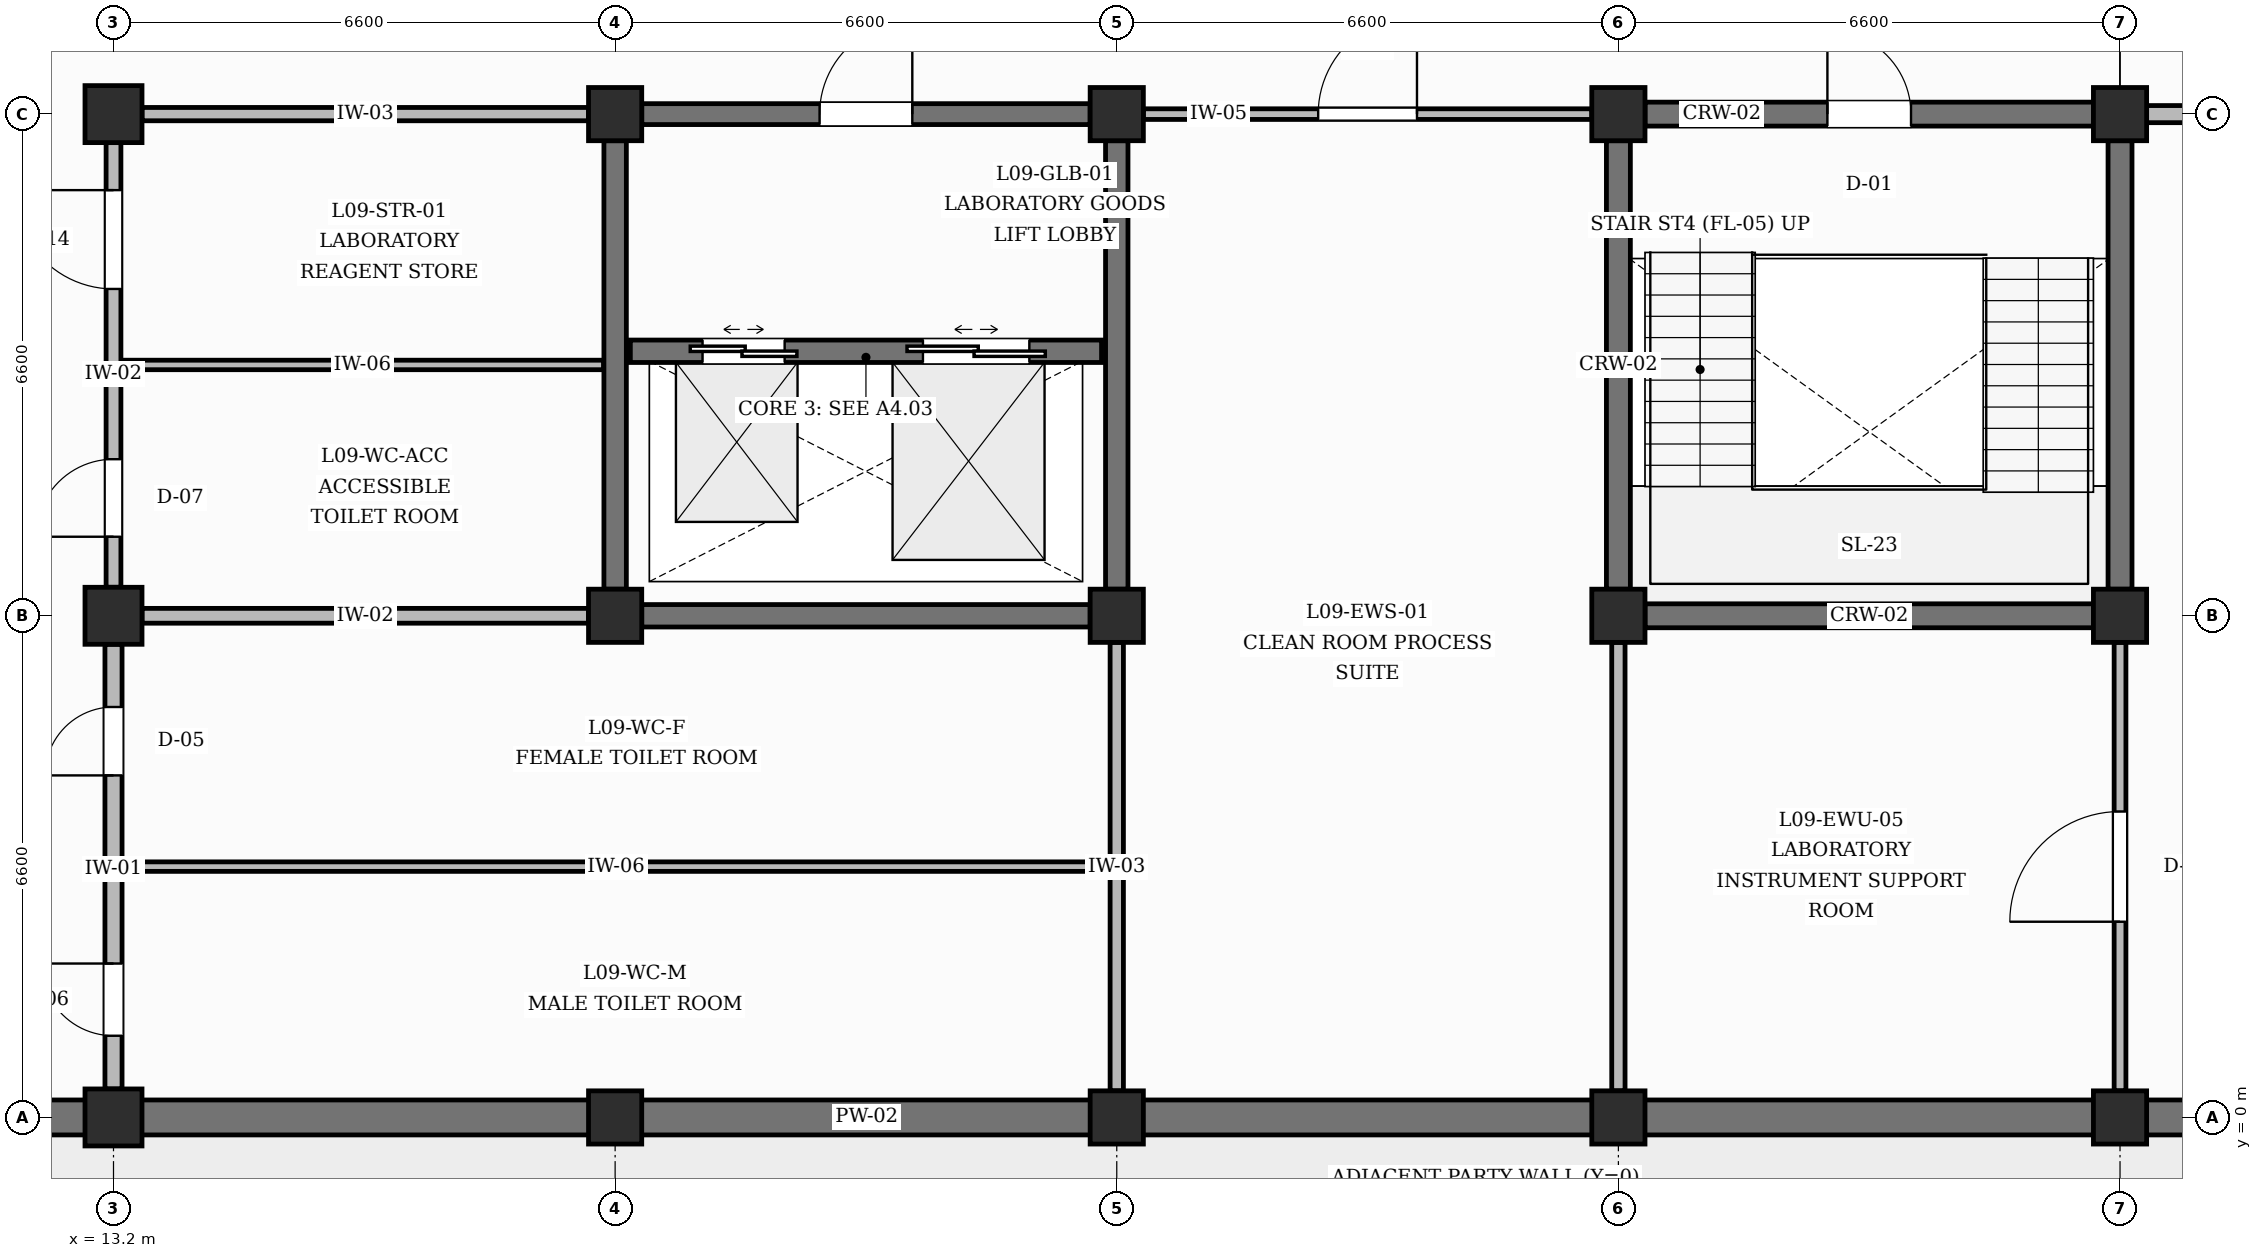
"""IFC4 building model, lengths in metres.
Left out: names, types, materials, properties, quantities, classifications, styles, units other than length and angle.
Written with IfcOpenShell. Run it as: python <this file> out.ifc"""

import sys

from ifc_helpers import new_model, si_unit, direction, frame, frame_2d, origin, origin_2d, place, context, subcontext, project, spatial, rectangle, extrude, element, fill, save


model = new_model("IFC4")
c1 = context("Model", 3, precision=1e-05, world=origin(), true_north=direction((0.0, 1.0)))
c2 = subcontext(c1, "Body", "Model", "MODEL_VIEW")
j1 = project(units=[si_unit("LENGTHUNIT", "METRE"), si_unit("PLANEANGLEUNIT", "RADIAN")], contexts=[c1])
p1 = place(None, origin())
s1 = spatial("IfcSite", under=j1, at=p1, CompositionType="ELEMENT")
p2 = place(p1, origin())
s2 = spatial("IfcBuilding", under=s1, at=p2, CompositionType="ELEMENT")
p3 = place(p2, frame((0.0, 0.0, 39.6)))
s3 = spatial("IfcBuildingStorey", under=s2, at=p3, CompositionType="ELEMENT", Elevation=39.6)
for number, where, z_axis, x_axis in (
    (1, (13.2, 0.0, 0.0), (0.0, 0.0, 1.0), (1.0, 0.0, 0.0)),
    (2, (13.2, 6.6, 0.0), (0.0, 0.0, 1.0), (1.0, 0.0, 0.0)),
    (3, (13.2, 13.2, 0.0), (0.0, 0.0, 1.0), (1.0, 0.0, 0.0)),
):
    element("IfcColumn", number, at=place(p3, frame(where, z_axis=z_axis, x_axis=x_axis)), inside=s3, PredefinedType="COLUMN", context=c2, shape_type="SweptSolid", body=[
        extrude(rectangle(XDim=0.75, YDim=0.75, at=origin_2d()), origin(), (0.0, 0.0, 1.0), 4.2),
    ])
for number, where, z_axis, x_axis in (
    (4, (19.8, 0.0, 0.0), (0.0, 0.0, 1.0), (1.0, 0.0, 0.0)),
    (5, (19.8, 6.6, 0.0), (0.0, 0.0, 1.0), (1.0, 0.0, 0.0)),
    (6, (19.8, 13.2, 0.0), (0.0, 0.0, 1.0), (1.0, 0.0, 0.0)),
    (7, (26.4, 0.0, 0.0), (0.0, 0.0, 1.0), (1.0, 0.0, 0.0)),
    (8, (26.4, 6.6, 0.0), (0.0, 0.0, 1.0), (1.0, 0.0, 0.0)),
    (9, (26.4, 13.2, 0.0), (0.0, 0.0, 1.0), (1.0, 0.0, 0.0)),
    (10, (33.0, 0.0, 0.0), (0.0, 0.0, 1.0), (1.0, 0.0, 0.0)),
    (11, (33.0, 6.6, 0.0), (0.0, 0.0, 1.0), (1.0, 0.0, 0.0)),
    (12, (33.0, 13.2, 0.0), (0.0, 0.0, 1.0), (1.0, 0.0, 0.0)),
    (13, (39.6, 0.0, 0.0), (0.0, 0.0, 1.0), (1.0, 0.0, 0.0)),
    (14, (39.6, 6.6, 0.0), (0.0, 0.0, 1.0), (1.0, 0.0, 0.0)),
    (15, (39.6, 13.2, 0.0), (0.0, 0.0, 1.0), (1.0, 0.0, 0.0)),
):
    element("IfcColumn", number, at=place(p3, frame(where, z_axis=z_axis, x_axis=x_axis)), inside=s3, PredefinedType="COLUMN", context=c2, shape_type="SweptSolid", body=[
        extrude(rectangle(XDim=0.7, YDim=0.7, at=origin_2d()), origin(), (0.0, 0.0, 1.0), 4.2),
    ])
p4 = place(p3, frame((6.975, 0.0, 0.0), z_axis=(0.0, 0.0, 1.0), x_axis=(1.0, 0.0, 0.0)))
e16 = element("IfcWall", 16, at=p4, inside=s3, PredefinedType="SOLIDWALL", context=c2, shape_type="SweptSolid", body=[
    extrude(rectangle(XDim=5.85, YDim=0.46, at=frame_2d((2.925, 0.0))), origin(), (0.0, 0.0, 1.0), 3.29),
])
p5 = place(p3, frame((13.575, 0.0, 0.0), z_axis=(0.0, 0.0, 1.0), x_axis=(1.0, 0.0, 0.0)))
e17 = element("IfcWall", 17, at=p5, inside=s3, PredefinedType="SOLIDWALL", context=c2, shape_type="SweptSolid", body=[
    extrude(rectangle(XDim=5.875, YDim=0.46, at=frame_2d((2.938, 0.0))), origin(), (0.0, 0.0, 1.0), 3.29),
])
p6 = place(p3, frame((20.15, 0.0, 0.0), z_axis=(0.0, 0.0, 1.0), x_axis=(1.0, 0.0, 0.0)))
e18 = element("IfcWall", 18, at=p6, inside=s3, PredefinedType="SOLIDWALL", context=c2, shape_type="SweptSolid", body=[
    extrude(rectangle(XDim=5.9, YDim=0.46, at=frame_2d((2.95, 0.0))), origin(), (0.0, 0.0, 1.0), 3.29),
])
for number, where, z_axis, x_axis in (
    (19, (26.75, 0.0, 0.0), (0.0, 0.0, 1.0), (1.0, 0.0, 0.0)),
    (20, (33.35, 0.0, 0.0), (0.0, 0.0, 1.0), (1.0, 0.0, 0.0)),
):
    element("IfcWall", number, at=place(p3, frame(where, z_axis=z_axis, x_axis=x_axis)), inside=s3, PredefinedType="SOLIDWALL", context=c2, shape_type="SweptSolid", body=[
        extrude(rectangle(XDim=5.9, YDim=0.46, at=frame_2d((2.95, 0.0))), origin(), (0.0, 0.0, 1.0), 3.29),
    ])
p7 = place(p3, frame((39.95, 0.0, 0.0), z_axis=(0.0, 0.0, 1.0), x_axis=(1.0, 0.0, 0.0)))
e21 = element("IfcWall", 21, at=p7, inside=s3, PredefinedType="SOLIDWALL", context=c2, shape_type="SweptSolid", body=[
    extrude(rectangle(XDim=5.9, YDim=0.46, at=frame_2d((2.95, 0.0))), origin(), (0.0, 0.0, 1.0), 3.29),
])
p8 = place(p3, frame((33.35, 6.6, 0.0), z_axis=(0.0, 0.0, 1.0), x_axis=(1.0, 0.0, 0.0)))
e22 = element("IfcWall", 22, at=p8, inside=s3, PredefinedType="SHEAR", context=c2, shape_type="SweptSolid", body=[
    extrude(rectangle(XDim=5.9, YDim=0.315, at=frame_2d((2.95, 0.0))), origin(), (0.0, 0.0, 1.0), 3.29),
])
p9 = place(p3, frame((33.35, 13.2, 0.0), z_axis=(0.0, 0.0, 1.0), x_axis=(1.0, 0.0, 0.0)))
e23 = element("IfcWall", 23, at=p9, inside=s3, PredefinedType="SHEAR", context=c2, shape_type="SweptSolid", body=[
    extrude(rectangle(XDim=5.9, YDim=0.315, at=frame_2d((2.95, 0.0))), origin(), (0.0, 0.0, 1.0), 3.29),
])
p10 = place(p9, frame((2.4, 0.0, 0.0)))
e24 = element("IfcOpeningElement", 24, at=p10, cuts=e23, PredefinedType="OPENING", context=c2, shape_type="SweptSolid", body=[
    extrude(rectangle(XDim=1.1, YDim=2.15, at=frame_2d((0.55, 1.075))), frame((0.0, 0.167, 0.0), z_axis=(0.0, -1.0, 0.0), x_axis=(1.0, 0.0, 0.0)), (0.0, 0.0, 1.0), 0.335),
])
for number, where, z_axis, x_axis in (
    (25, (33.0, 6.95, 0.0), (0.0, 0.0, 1.0), (0.0, 1.0, 0.0)),
    (26, (39.6, 6.95, 0.0), (0.0, 0.0, 1.0), (0.0, 1.0, 0.0)),
):
    element("IfcWall", number, at=place(p3, frame(where, z_axis=z_axis, x_axis=x_axis)), inside=s3, PredefinedType="SHEAR", context=c2, shape_type="SweptSolid", body=[
        extrude(rectangle(XDim=5.9, YDim=0.315, at=frame_2d((2.95, 0.0))), origin(), (0.0, 0.0, 1.0), 3.29),
    ])
for number, where, z_axis, x_axis in (
    (27, (20.15, 6.6, 0.0), (0.0, 0.0, 1.0), (1.0, 0.0, 0.0)),
    (28, (19.8, 6.95, 0.0), (0.0, 0.0, 1.0), (0.0, 1.0, 0.0)),
    (29, (26.4, 6.95, 0.0), (0.0, 0.0, 1.0), (0.0, 1.0, 0.0)),
):
    element("IfcWall", number, at=place(p3, frame(where, z_axis=z_axis, x_axis=x_axis)), inside=s3, PredefinedType="SHEAR", context=c2, shape_type="SweptSolid", body=[
        extrude(rectangle(XDim=5.9, YDim=0.295, at=frame_2d((2.95, 0.0))), origin(), (0.0, 0.0, 1.0), 3.29),
    ])
p11 = place(p3, frame((20.15, 13.2, 0.0), z_axis=(0.0, 0.0, 1.0), x_axis=(1.0, 0.0, 0.0)))
e30 = element("IfcWall", 30, at=p11, inside=s3, PredefinedType="SHEAR", context=c2, shape_type="SweptSolid", body=[
    extrude(rectangle(XDim=5.9, YDim=0.275, at=frame_2d((2.95, 0.0))), origin(), (0.0, 0.0, 1.0), 3.29),
])
p12 = place(p11, frame((2.34, 0.0, 0.0)))
e31 = element("IfcOpeningElement", 31, at=p12, cuts=e30, PredefinedType="OPENING", context=c2, shape_type="SweptSolid", body=[
    extrude(rectangle(XDim=1.22, YDim=2.15, at=frame_2d((0.61, 1.075))), frame((0.0, 0.147, 0.0), z_axis=(0.0, -1.0, 0.0), x_axis=(1.0, 0.0, 0.0)), (0.0, 0.0, 1.0), 0.295),
])
p13 = place(p3, frame((20.0, 10.08, 0.0), z_axis=(0.0, 0.0, 1.0), x_axis=(1.0, 0.0, 0.0)))
e32 = element("IfcWall", 32, at=p13, inside=s3, PredefinedType="SHEAR", context=c2, shape_type="SweptSolid", body=[
    extrude(rectangle(XDim=6.2, YDim=0.295, at=frame_2d((3.1, 0.0))), origin(), (0.0, 0.0, 1.0), 3.89),
])
p14 = place(p13, frame((0.95, 0.0, 0.0)))
e33 = element("IfcOpeningElement", 33, at=p14, cuts=e32, PredefinedType="OPENING", context=c2, shape_type="SweptSolid", body=[
    extrude(rectangle(XDim=1.08, YDim=2.15, at=frame_2d((0.54, 1.075))), frame((0.0, 0.157, 0.0), z_axis=(0.0, -1.0, 0.0), x_axis=(1.0, 0.0, 0.0)), (0.0, 0.0, 1.0), 0.315),
])
p15 = place(p13, frame((3.85, 0.0, 0.0)))
e34 = element("IfcOpeningElement", 34, at=p15, cuts=e32, PredefinedType="OPENING", context=c2, shape_type="SweptSolid", body=[
    extrude(rectangle(XDim=1.4, YDim=2.35, at=frame_2d((0.7, 1.175))), frame((0.0, 0.157, 0.0), z_axis=(0.0, -1.0, 0.0), x_axis=(1.0, 0.0, 0.0)), (0.0, 0.0, 1.0), 0.315),
])
p16 = place(p3, frame((13.2, 0.375, 0.0), z_axis=(0.0, 0.0, 1.0), x_axis=(0.0, 1.0, 0.0)))
e35 = element("IfcWall", 35, at=p16, inside=s3, PredefinedType="PARTITIONING", context=c2, shape_type="SweptSolid", body=[
    extrude(rectangle(XDim=5.85, YDim=0.225, at=frame_2d((2.925, 0.0))), origin(), (0.0, 0.0, 1.0), 3.29),
])
p17 = place(p16, frame((0.7, 0.0, 0.0)))
e36 = element("IfcOpeningElement", 36, at=p17, cuts=e35, PredefinedType="OPENING", context=c2, shape_type="SweptSolid", body=[
    extrude(rectangle(XDim=0.95, YDim=2.1, at=frame_2d((0.475, 1.05))), frame((0.0, 0.123, 0.0), z_axis=(0.0, -1.0, 0.0), x_axis=(1.0, 0.0, 0.0)), (0.0, 0.0, 1.0), 0.245),
])
p18 = place(p16, frame((4.125, 0.0, 0.0)))
e37 = element("IfcOpeningElement", 37, at=p18, cuts=e35, PredefinedType="OPENING", context=c2, shape_type="SweptSolid", body=[
    extrude(rectangle(XDim=0.9, YDim=2.1, at=frame_2d((0.45, 1.05))), frame((0.0, 0.123, 0.0), z_axis=(0.0, -1.0, 0.0), x_axis=(1.0, 0.0, 0.0)), (0.0, 0.0, 1.0), 0.245),
])
p19 = place(p3, frame((26.4, 0.35, 0.0), z_axis=(0.0, 0.0, 1.0), x_axis=(0.0, 1.0, 0.0)))
e38 = element("IfcWall", 38, at=p19, inside=s3, PredefinedType="PARTITIONING", context=c2, shape_type="SweptSolid", body=[
    extrude(rectangle(XDim=5.9, YDim=0.175, at=frame_2d((2.95, 0.0))), origin(), (0.0, 0.0, 1.0), 3.29),
])
p20 = place(p3, frame((13.575, 6.6, 0.0), z_axis=(0.0, 0.0, 1.0), x_axis=(1.0, 0.0, 0.0)))
e39 = element("IfcWall", 39, at=p20, inside=s3, PredefinedType="PARTITIONING", context=c2, shape_type="SweptSolid", body=[
    extrude(rectangle(XDim=5.875, YDim=0.195, at=frame_2d((2.938, 0.0))), origin(), (0.0, 0.0, 1.0), 3.29),
])
p21 = place(p3, frame((13.2, 6.975, 0.0), z_axis=(0.0, 0.0, 1.0), x_axis=(0.0, 1.0, 0.0)))
e40 = element("IfcWall", 40, at=p21, inside=s3, PredefinedType="PARTITIONING", context=c2, shape_type="SweptSolid", body=[
    extrude(rectangle(XDim=5.85, YDim=0.195, at=frame_2d((2.925, 0.0))), origin(), (0.0, 0.0, 1.0), 3.29),
])
p22 = place(p21, frame((0.665, 0.0, 0.0)))
e41 = element("IfcOpeningElement", 41, at=p22, cuts=e40, PredefinedType="OPENING", context=c2, shape_type="SweptSolid", body=[
    extrude(rectangle(XDim=1.02, YDim=2.15, at=frame_2d((0.51, 1.075))), frame((0.0, 0.107, 0.0), z_axis=(0.0, -1.0, 0.0), x_axis=(1.0, 0.0, 0.0)), (0.0, 0.0, 1.0), 0.215),
])
p23 = place(p21, frame((3.925, 0.0, 0.0)))
e42 = element("IfcOpeningElement", 42, at=p23, cuts=e40, PredefinedType="OPENING", context=c2, shape_type="SweptSolid", body=[
    extrude(rectangle(XDim=1.3, YDim=2.3, at=frame_2d((0.65, 1.15))), frame((0.0, 0.107, 0.0), z_axis=(0.0, -1.0, 0.0), x_axis=(1.0, 0.0, 0.0)), (0.0, 0.0, 1.0), 0.215),
])
p24 = place(p3, frame((13.575, 13.2, 0.0), z_axis=(0.0, 0.0, 1.0), x_axis=(1.0, 0.0, 0.0)))
e43 = element("IfcWall", 43, at=p24, inside=s3, PredefinedType="PARTITIONING", context=c2, shape_type="SweptSolid", body=[
    extrude(rectangle(XDim=5.875, YDim=0.175, at=frame_2d((2.938, 0.0))), origin(), (0.0, 0.0, 1.0), 3.29),
])
p25 = place(p3, frame((33.0, 0.35, 0.0), z_axis=(0.0, 0.0, 1.0), x_axis=(0.0, 1.0, 0.0)))
e44 = element("IfcWall", 44, at=p25, inside=s3, PredefinedType="PARTITIONING", context=c2, shape_type="SweptSolid", body=[
    extrude(rectangle(XDim=5.9, YDim=0.175, at=frame_2d((2.95, 0.0))), origin(), (0.0, 0.0, 1.0), 3.29),
])
p26 = place(p3, frame((26.75, 13.2, 0.0), z_axis=(0.0, 0.0, 1.0), x_axis=(1.0, 0.0, 0.0)))
e45 = element("IfcWall", 45, at=p26, inside=s3, PredefinedType="PARTITIONING", context=c2, shape_type="SweptSolid", body=[
    extrude(rectangle(XDim=5.9, YDim=0.14, at=frame_2d((2.95, 0.0))), origin(), (0.0, 0.0, 1.0), 3.29),
])
p27 = place(p26, frame((2.3, 0.0, 0.0)))
e46 = element("IfcOpeningElement", 46, at=p27, cuts=e45, PredefinedType="OPENING", context=c2, shape_type="SweptSolid", body=[
    extrude(rectangle(XDim=1.3, YDim=2.3, at=frame_2d((0.65, 1.15))), frame((0.0, 0.08, 0.0), z_axis=(0.0, -1.0, 0.0), x_axis=(1.0, 0.0, 0.0)), (0.0, 0.0, 1.0), 0.16),
])
p28 = place(p3, frame((39.6, 0.35, 0.0), z_axis=(0.0, 0.0, 1.0), x_axis=(0.0, 1.0, 0.0)))
e47 = element("IfcWall", 47, at=p28, inside=s3, PredefinedType="PARTITIONING", context=c2, shape_type="SweptSolid", body=[
    extrude(rectangle(XDim=5.9, YDim=0.155, at=frame_2d((2.95, 0.0))), origin(), (0.0, 0.0, 1.0), 3.29),
])
p29 = place(p28, frame((2.225, 0.0, 0.0)))
e48 = element("IfcOpeningElement", 48, at=p29, cuts=e47, PredefinedType="OPENING", context=c2, shape_type="SweptSolid", body=[
    extrude(rectangle(XDim=1.45, YDim=2.25, at=frame_2d((0.725, 1.125))), frame((0.0, 0.087, 0.0), z_axis=(0.0, -1.0, 0.0), x_axis=(1.0, 0.0, 0.0)), (0.0, 0.0, 1.0), 0.175),
])
p30 = place(p3, frame((39.95, 13.2, 0.0), z_axis=(0.0, 0.0, 1.0), x_axis=(1.0, 0.0, 0.0)))
e49 = element("IfcWall", 49, at=p30, inside=s3, PredefinedType="PARTITIONING", context=c2, shape_type="SweptSolid", body=[
    extrude(rectangle(XDim=5.9, YDim=0.225, at=frame_2d((2.95, 0.0))), origin(), (0.0, 0.0, 1.0), 3.29),
])
p31 = place(p30, frame((2.325, 0.0, 0.0)))
e50 = element("IfcOpeningElement", 50, at=p31, cuts=e49, PredefinedType="OPENING", context=c2, shape_type="SweptSolid", body=[
    extrude(rectangle(XDim=1.25, YDim=2.25, at=frame_2d((0.625, 1.125))), frame((0.0, 0.123, 0.0), z_axis=(0.0, -1.0, 0.0), x_axis=(1.0, 0.0, 0.0)), (0.0, 0.0, 1.0), 0.245),
])
p32 = place(p3, frame((13.317, 3.3, 0.0), z_axis=(0.0, 0.0, 1.0), x_axis=(1.0, 0.0, 0.0)))
e51 = element("IfcWall", 51, at=p32, inside=s3, PredefinedType="PARTITIONING", context=c2, shape_type="SweptSolid", body=[
    extrude(rectangle(XDim=12.99, YDim=0.125, at=frame_2d((6.495, 0.0))), origin(), (0.0, 0.0, 1.0), 3.89),
])
p33 = place(p3, frame((13.302, 9.9, 0.0), z_axis=(0.0, 0.0, 1.0), x_axis=(1.0, 0.0, 0.0)))
e52 = element("IfcWall", 52, at=p33, inside=s3, PredefinedType="PARTITIONING", context=c2, shape_type="SweptSolid", body=[
    extrude(rectangle(XDim=6.345, YDim=0.125, at=frame_2d((3.172, 0.0))), origin(), (0.0, 0.0, 1.0), 3.89),
])
p34 = place(p10, origin())
e53 = element("IfcDoor", 53, at=p34, inside=s3, OperationType="SINGLE_SWING_LEFT", PredefinedType="DOOR", context=c2, shape_type="SweptSolid", body=[
    extrude(rectangle(XDim=1.1, YDim=2.15, at=frame_2d((0.55, 1.075))), frame((0.0, 0.025, 0.0), z_axis=(0.0, -1.0, 0.0), x_axis=(1.0, 0.0, 0.0)), (0.0, 0.0, 1.0), 0.05),
])
fill(e24, e53)
p35 = place(p14, origin())
e54 = element("IfcDoor", 54, at=p35, inside=s3, OperationType="DOUBLE_DOOR_SLIDING", PredefinedType="USERDEFINED", context=c2, shape_type="SweptSolid", body=[
    extrude(rectangle(XDim=1.08, YDim=2.15, at=frame_2d((0.54, 1.075))), frame((0.0, 0.025, 0.0), z_axis=(0.0, -1.0, 0.0), x_axis=(1.0, 0.0, 0.0)), (0.0, 0.0, 1.0), 0.05),
])
fill(e33, e54)
p36 = place(p15, origin())
e55 = element("IfcDoor", 55, at=p36, inside=s3, OperationType="DOUBLE_DOOR_SLIDING", PredefinedType="USERDEFINED", context=c2, shape_type="SweptSolid", body=[
    extrude(rectangle(XDim=1.4, YDim=2.35, at=frame_2d((0.7, 1.175))), frame((0.0, 0.025, 0.0), z_axis=(0.0, -1.0, 0.0), x_axis=(1.0, 0.0, 0.0)), (0.0, 0.0, 1.0), 0.05),
])
fill(e34, e55)
p37 = place(p12, origin())
e56 = element("IfcDoor", 56, at=p37, inside=s3, OperationType="SINGLE_SWING_RIGHT", PredefinedType="DOOR", context=c2, shape_type="SweptSolid", body=[
    extrude(rectangle(XDim=1.22, YDim=2.15, at=frame_2d((0.61, 1.075))), frame((0.0, 0.025, 0.0), z_axis=(0.0, -1.0, 0.0), x_axis=(1.0, 0.0, 0.0)), (0.0, 0.0, 1.0), 0.05),
])
fill(e31, e56)
p38 = place(p17, origin())
e57 = element("IfcDoor", 57, at=p38, inside=s3, OperationType="SINGLE_SWING_RIGHT", PredefinedType="DOOR", context=c2, shape_type="SweptSolid", body=[
    extrude(rectangle(XDim=0.95, YDim=2.1, at=frame_2d((0.475, 1.05))), frame((0.0, 0.025, 0.0), z_axis=(0.0, -1.0, 0.0), x_axis=(1.0, 0.0, 0.0)), (0.0, 0.0, 1.0), 0.05),
])
fill(e36, e57)
p39 = place(p18, origin())
e58 = element("IfcDoor", 58, at=p39, inside=s3, OperationType="SINGLE_SWING_LEFT", PredefinedType="DOOR", context=c2, shape_type="SweptSolid", body=[
    extrude(rectangle(XDim=0.9, YDim=2.1, at=frame_2d((0.45, 1.05))), frame((0.0, 0.025, 0.0), z_axis=(0.0, -1.0, 0.0), x_axis=(1.0, 0.0, 0.0)), (0.0, 0.0, 1.0), 0.05),
])
fill(e37, e58)
p40 = place(p22, origin())
e59 = element("IfcDoor", 59, at=p40, inside=s3, OperationType="SINGLE_SWING_LEFT", PredefinedType="DOOR", context=c2, shape_type="SweptSolid", body=[
    extrude(rectangle(XDim=1.02, YDim=2.15, at=frame_2d((0.51, 1.075))), frame((0.0, 0.025, 0.0), z_axis=(0.0, -1.0, 0.0), x_axis=(1.0, 0.0, 0.0)), (0.0, 0.0, 1.0), 0.05),
])
fill(e41, e59)
p41 = place(p23, origin())
e60 = element("IfcDoor", 60, at=p41, inside=s3, OperationType="SINGLE_SWING_RIGHT", PredefinedType="DOOR", context=c2, shape_type="SweptSolid", body=[
    extrude(rectangle(XDim=1.3, YDim=2.3, at=frame_2d((0.65, 1.15))), frame((0.0, 0.025, 0.0), z_axis=(0.0, -1.0, 0.0), x_axis=(1.0, 0.0, 0.0)), (0.0, 0.0, 1.0), 0.05),
])
fill(e42, e60)
p42 = place(p27, origin())
e61 = element("IfcDoor", 61, at=p42, inside=s3, OperationType="SINGLE_SWING_RIGHT", PredefinedType="DOOR", context=c2, shape_type="SweptSolid", body=[
    extrude(rectangle(XDim=1.3, YDim=2.3, at=frame_2d((0.65, 1.15))), frame((0.0, 0.025, 0.0), z_axis=(0.0, -1.0, 0.0), x_axis=(1.0, 0.0, 0.0)), (0.0, 0.0, 1.0), 0.05),
])
fill(e46, e61)
p43 = place(p29, origin())
e62 = element("IfcDoor", 62, at=p43, inside=s3, OperationType="SINGLE_SWING_LEFT", PredefinedType="DOOR", context=c2, shape_type="SweptSolid", body=[
    extrude(rectangle(XDim=1.45, YDim=2.25, at=frame_2d((0.725, 1.125))), frame((0.0, 0.025, 0.0), z_axis=(0.0, -1.0, 0.0), x_axis=(1.0, 0.0, 0.0)), (0.0, 0.0, 1.0), 0.05),
])
fill(e48, e62)
save(model, sys.argv[1])
